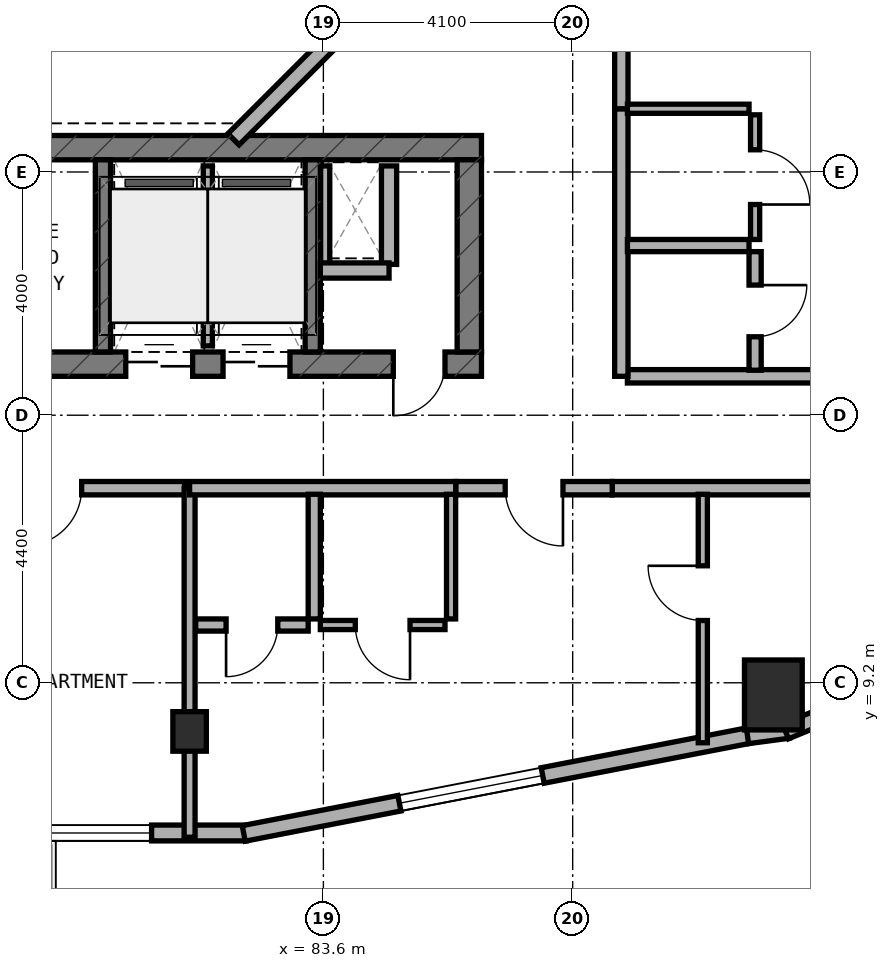
"""IFC4 building model, lengths in metres.
Left out: names, types, materials, properties, quantities, classifications, styles, units other than length and angle.
Written with IfcOpenShell. Run it as: python <this file> out.ifc"""

import sys

from ifc_helpers import new_model, si_unit, direction, frame, frame_2d, origin, origin_2d, place, context, subcontext, project, spatial, rectangle, extrude, element, fill, save


model = new_model("IFC4")
c1 = context("Model", 3, precision=1e-05, world=origin(), true_north=direction((0.0, 1.0)))
c2 = subcontext(c1, "Body", "Model", "MODEL_VIEW")
j1 = project(units=[si_unit("LENGTHUNIT", "METRE"), si_unit("PLANEANGLEUNIT", "RADIAN")], contexts=[c1])
p1 = place(None, origin())
s1 = spatial("IfcSite", under=j1, at=p1, CompositionType="ELEMENT")
p2 = place(p1, origin())
s2 = spatial("IfcBuilding", under=s1, at=p2, CompositionType="ELEMENT")
p3 = place(p2, frame((0.0, 0.0, 124.0)))
s3 = spatial("IfcBuildingStorey", under=s2, at=p3, CompositionType="ELEMENT", Elevation=124.0)
p4 = place(p3, frame((68.0, 14.44, 0.0), z_axis=(0.0, 0.0, 1.0), x_axis=(1.0, 0.0, 0.0)))
e1 = element("IfcWall", 1, at=p4, inside=s3, PredefinedType="SHEAR", context=c2, shape_type="SweptSolid", body=[
    extrude(rectangle(XDim=18.2, YDim=0.4, at=frame_2d((9.1, 0.0))), origin(), (0.0, 0.0, 1.0), 3.5),
])
p5 = place(p4, frame((9.15, 0.0, 0.0)))
e2 = element("IfcOpeningElement", 2, at=p5, cuts=e1, PredefinedType="OPENING", context=c2, shape_type="SweptSolid", body=[
    extrude(rectangle(XDim=1.2, YDim=2.15, at=frame_2d((0.6, 1.075))), frame((0.0, 0.21, 0.0), z_axis=(0.0, -1.0, 0.0), x_axis=(1.0, 0.0, 0.0)), (0.0, 0.0, 1.0), 0.42),
])
p6 = place(p4, frame((16.75, 0.0, 0.0)))
e3 = element("IfcOpeningElement", 3, at=p6, cuts=e1, PredefinedType="OPENING", context=c2, shape_type="SweptSolid", body=[
    extrude(rectangle(XDim=0.85, YDim=2.1, at=frame_2d((0.425, 1.05))), frame((0.0, 0.21, 0.0), z_axis=(0.0, -1.0, 0.0), x_axis=(1.0, 0.0, 0.0)), (0.0, 0.0, 1.0), 0.42),
])
p7 = place(p4, frame((12.35, 0.0, 0.0)))
e4 = element("IfcOpeningElement", 4, at=p7, cuts=e1, PredefinedType="OPENING", context=c2, shape_type="SweptSolid", body=[
    extrude(rectangle(XDim=1.1, YDim=2.15, at=frame_2d((0.55, 1.075))), frame((0.0, 0.21, 0.0), z_axis=(0.0, -1.0, 0.0), x_axis=(1.0, 0.0, 0.0)), (0.0, 0.0, 1.0), 0.42),
])
p8 = place(p4, frame((13.95, 0.0, 0.0)))
e5 = element("IfcOpeningElement", 5, at=p8, cuts=e1, PredefinedType="OPENING", context=c2, shape_type="SweptSolid", body=[
    extrude(rectangle(XDim=1.1, YDim=2.15, at=frame_2d((0.55, 1.075))), frame((0.0, 0.21, 0.0), z_axis=(0.0, -1.0, 0.0), x_axis=(1.0, 0.0, 0.0)), (0.0, 0.0, 1.0), 0.42),
])
p9 = place(p3, frame((68.0, 18.0, 0.0), z_axis=(0.0, 0.0, 1.0), x_axis=(1.0, 0.0, 0.0)))
e6 = element("IfcWall", 6, at=p9, inside=s3, PredefinedType="SHEAR", context=c2, shape_type="SweptSolid", body=[
    extrude(rectangle(XDim=18.2, YDim=0.4, at=frame_2d((9.1, 0.0))), origin(), (0.0, 0.0, 1.0), 3.5),
])
p10 = place(p3, frame((86.0, 14.64, 0.0), z_axis=(0.0, 0.0, 1.0), x_axis=(0.0, 1.0, 0.0)))
e7 = element("IfcWall", 7, at=p10, inside=s3, PredefinedType="SHEAR", context=c2, shape_type="SweptSolid", body=[
    extrude(rectangle(XDim=3.16, YDim=0.4, at=frame_2d((1.58, 0.0))), origin(), (0.0, 0.0, 1.0), 3.5),
])
for number, where, z_axis, x_axis in (
    (8, (79.975, 14.64, 0.0), (0.0, 0.0, 1.0), (0.0, 1.0, 0.0)),
    (9, (83.425, 14.64, 0.0), (0.0, 0.0, 1.0), (0.0, 1.0, 0.0)),
):
    element("IfcWall", number, at=place(p3, frame(where, z_axis=z_axis, x_axis=x_axis)), inside=s3, PredefinedType="STANDARD", context=c2, shape_type="SweptSolid", body=[
        extrude(rectangle(XDim=3.16, YDim=0.25, at=frame_2d((1.58, 0.0))), origin(), (0.0, 0.0, 1.0), 3.25),
    ])
p11 = place(p3, frame((81.4, 8.4, 0.0), z_axis=(0.0, 0.0, 1.0), x_axis=(1.0, 0.0, 0.0)))
e10 = element("IfcColumn", 10, at=p11, inside=s3, PredefinedType="COLUMN", context=c2, shape_type="SweptSolid", body=[
    extrude(rectangle(XDim=0.55, YDim=0.65, at=origin_2d()), origin(), (0.0, 0.0, 1.0), 3.5),
])
p12 = place(p3, frame((91.0, 9.0, 0.0), z_axis=(0.0, 0.0, 1.0), x_axis=(1.0, 0.0, 0.0)))
e11 = element("IfcColumn", 11, at=p12, inside=s3, PredefinedType="COLUMN", context=c2, shape_type="SweptSolid", body=[
    extrude(rectangle(XDim=0.95, YDim=1.15, at=origin_2d()), origin(), (0.0, 0.0, 1.0), 3.5),
])
p13 = place(p3, frame((71.635, 6.73, 0.0), z_axis=(0.0, 0.0, 1.0), x_axis=(1.0, 0.0, 0.0)))
e12 = element("IfcWall", 12, at=p13, inside=s3, PredefinedType="STANDARD", context=c2, shape_type="SweptSolid", body=[
    extrude(rectangle(XDim=10.695, YDim=0.26, at=frame_2d((5.348, 0.0))), origin(), (0.0, 0.0, 1.0), 3.25),
])
p14 = place(p13, frame((4.765, 0.0, 0.0)))
e13 = element("IfcOpeningElement", 13, at=p14, cuts=e12, PredefinedType="OPENING", context=c2, shape_type="SweptSolid", body=[
    extrude(rectangle(XDim=1.2, YDim=2.15, at=frame_2d((0.6, 1.075))), frame((0.0, 0.14, 0.0), z_axis=(0.0, -1.0, 0.0), x_axis=(1.0, 0.0, 0.0)), (0.0, 0.0, 1.0), 0.28),
])
p15 = place(p13, frame((1.59, 0.0, 0.8)))
e14 = element("IfcOpeningElement", 14, at=p15, cuts=e12, PredefinedType="OPENING", context=c2, shape_type="SweptSolid", body=[
    extrude(rectangle(XDim=2.4, YDim=1.6, at=frame_2d((1.2, 0.8))), frame((0.0, 0.14, 0.0), z_axis=(0.0, -1.0, 0.0), x_axis=(1.0, 0.0, 0.0)), (0.0, 0.0, 1.0), 0.28),
])
p16 = place(p13, frame((6.74, 0.0, 0.8)))
e15 = element("IfcOpeningElement", 15, at=p16, cuts=e12, PredefinedType="OPENING", context=c2, shape_type="SweptSolid", body=[
    extrude(rectangle(XDim=2.4, YDim=1.6, at=frame_2d((1.2, 0.8))), frame((0.0, 0.14, 0.0), z_axis=(0.0, -1.0, 0.0), x_axis=(1.0, 0.0, 0.0)), (0.0, 0.0, 1.0), 0.28),
])
p17 = place(p3, frame((82.29, 6.723, 0.0), z_axis=(0.0, 0.0, 1.0), x_axis=(0.981733729692, 0.190260043057, 0.0)))
e16 = element("IfcWall", 16, at=p17, inside=s3, PredefinedType="STANDARD", context=c2, shape_type="SweptSolid", body=[
    extrude(rectangle(XDim=8.447, YDim=0.26, at=frame_2d((4.224, 0.0))), origin(), (0.0, 0.0, 1.0), 3.25),
])
p18 = place(p17, frame((2.608, 0.0, 0.8)))
e17 = element("IfcOpeningElement", 17, at=p18, cuts=e16, PredefinedType="OPENING", context=c2, shape_type="SweptSolid", body=[
    extrude(rectangle(XDim=2.4, YDim=1.6, at=frame_2d((1.2, 0.8))), frame((0.0, 0.14, 0.0), z_axis=(0.0, -1.0, 0.0), x_axis=(1.0, 0.0, 0.0)), (0.0, 0.0, 1.0), 0.28),
])
p19 = place(p3, frame((90.575, 8.328, 0.0), z_axis=(0.0, 0.0, 1.0), x_axis=(0.991300187529, 0.13162043232, 0.0)))
e18 = element("IfcWall", 18, at=p19, inside=s3, PredefinedType="STANDARD", context=c2, shape_type="SweptSolid", body=[
    extrude(rectangle(XDim=0.677, YDim=0.26, at=frame_2d((0.338, 0.0))), origin(), (0.0, 0.0, 1.0), 3.25),
])
p20 = place(p3, frame((91.2, 8.399, 0.0), z_axis=(0.0, 0.0, 1.0), x_axis=(0.924093981904, 0.382165294877, 0.0)))
e19 = element("IfcWall", 19, at=p20, inside=s3, PredefinedType="STANDARD", context=c2, shape_type="SweptSolid", body=[
    extrude(rectangle(XDim=0.694, YDim=0.26, at=frame_2d((0.347, 0.0))), origin(), (0.0, 0.0, 1.0), 3.25),
])
p21 = place(p3, frame((82.122, 18.138, 0.0), z_axis=(0.0, 0.0, 1.0), x_axis=(0.707106781187, 0.707106781187, 0.0)))
e20 = element("IfcWall", 20, at=p21, inside=s3, PredefinedType="STANDARD", context=c2, shape_type="SweptSolid", body=[
    extrude(rectangle(XDim=2.311, YDim=0.26, at=frame_2d((1.155, 0.0))), origin(), (0.0, 0.0, 1.0), 3.25),
])
p22 = place(p3, frame((83.63, 16.08, 0.0), z_axis=(0.0, 0.0, 1.0), x_axis=(0.0, 1.0, 0.0)))
e21 = element("IfcWall", 21, at=p22, inside=s3, PredefinedType="PARTITIONING", context=c2, shape_type="SweptSolid", body=[
    extrude(rectangle(XDim=1.62, YDim=0.15, at=frame_2d((0.81, 0.0))), origin(), (0.0, 0.0, 1.0), 2.825),
])
p23 = place(p3, frame((84.68, 16.08, 0.0), z_axis=(0.0, 0.0, 1.0), x_axis=(0.0, 1.0, 0.0)))
e22 = element("IfcWall", 22, at=p23, inside=s3, PredefinedType="SOLIDWALL", context=c2, shape_type="SweptSolid", body=[
    extrude(rectangle(XDim=1.62, YDim=0.25, at=frame_2d((0.81, 0.0))), origin(), (0.0, 0.0, 1.0), 3.22),
])
p24 = place(p3, frame((83.55, 15.98, 0.0), z_axis=(0.0, 0.0, 1.0), x_axis=(1.0, 0.0, 0.0)))
e23 = element("IfcWall", 23, at=p24, inside=s3, PredefinedType="SOLIDWALL", context=c2, shape_type="SweptSolid", body=[
    extrude(rectangle(XDim=1.13, YDim=0.25, at=frame_2d((0.565, 0.0))), origin(), (0.0, 0.0, 1.0), 3.22),
])
p25 = place(p3, frame((81.7, 14.74, 0.0), z_axis=(0.0, 0.0, 1.0), x_axis=(0.0, 1.0, 0.0)))
e24 = element("IfcWall", 24, at=p25, inside=s3, PredefinedType="PARTITIONING", context=c2, shape_type="SweptSolid", body=[
    extrude(rectangle(XDim=2.96, YDim=0.15, at=frame_2d((1.48, 0.0))), origin(), (0.0, 0.0, 1.0), 3.22),
])
p26 = place(p3, frame((76.98, 12.4, 0.0), z_axis=(0.0, 0.0, 1.0), x_axis=(1.0, 0.0, 0.0)))
e25 = element("IfcWall", 25, at=p26, inside=s3, PredefinedType="SOLIDWALL", context=c2, shape_type="SweptSolid", body=[
    extrude(rectangle(XDim=4.34, YDim=0.22, at=frame_2d((2.17, 0.0))), origin(), (0.0, 0.0, 1.0), 2.825),
])
p27 = place(p26, frame((1.695, 0.0, 0.0)))
e26 = element("IfcOpeningElement", 26, at=p27, cuts=e25, PredefinedType="OPENING", context=c2, shape_type="SweptSolid", body=[
    extrude(rectangle(XDim=0.95, YDim=2.1, at=frame_2d((0.475, 1.05))), frame((0.0, 0.12, 0.0), z_axis=(0.0, -1.0, 0.0), x_axis=(1.0, 0.0, 0.0)), (0.0, 0.0, 1.0), 0.24),
])
p28 = place(p3, frame((81.4, 6.66, 0.0), z_axis=(0.0, 0.0, 1.0), x_axis=(0.0, 1.0, 0.0)))
e27 = element("IfcWall", 27, at=p28, inside=s3, PredefinedType="SOLIDWALL", context=c2, shape_type="SweptSolid", body=[
    extrude(rectangle(XDim=5.74, YDim=0.18, at=frame_2d((2.87, 0.0))), origin(), (0.0, 0.0, 1.0), 2.825),
])
p29 = place(p3, frame((81.4, 12.4, 0.0), z_axis=(0.0, 0.0, 1.0), x_axis=(1.0, 0.0, 0.0)))
e28 = element("IfcWall", 28, at=p29, inside=s3, PredefinedType="SOLIDWALL", context=c2, shape_type="SweptSolid", body=[
    extrude(rectangle(XDim=4.38, YDim=0.22, at=frame_2d((2.19, 0.0))), origin(), (0.0, 0.0, 1.0), 2.825),
])
p30 = place(p3, frame((88.35, 12.4, 0.0), z_axis=(0.0, 0.0, 1.0), x_axis=(1.0, 0.0, 0.0)))
e29 = element("IfcWall", 29, at=p30, inside=s3, PredefinedType="SOLIDWALL", context=c2, shape_type="SweptSolid", body=[
    extrude(rectangle(XDim=6.29, YDim=0.22, at=frame_2d((3.145, 0.0))), origin(), (0.0, 0.0, 1.0), 2.945),
])
p31 = place(p3, frame((85.78, 12.4, 0.0), z_axis=(0.0, 0.0, 1.0), x_axis=(1.0, 0.0, 0.0)))
e30 = element("IfcWall", 30, at=p31, inside=s3, PredefinedType="SOLIDWALL", context=c2, shape_type="SweptSolid", body=[
    extrude(rectangle(XDim=2.57, YDim=0.22, at=frame_2d((1.285, 0.0))), origin(), (0.0, 0.0, 1.0), 3.22),
])
p32 = place(p31, frame((0.81, 0.0, 0.0)))
e31 = element("IfcOpeningElement", 31, at=p32, cuts=e30, PredefinedType="OPENING", context=c2, shape_type="SweptSolid", body=[
    extrude(rectangle(XDim=0.95, YDim=2.1, at=frame_2d((0.475, 1.05))), frame((0.0, 0.12, 0.0), z_axis=(0.0, -1.0, 0.0), x_axis=(1.0, 0.0, 0.0)), (0.0, 0.0, 1.0), 0.24),
])
p33 = place(p3, frame((89.84, 8.214, 0.0), z_axis=(0.0, 0.0, 1.0), x_axis=(0.0, 1.0, 0.0)))
e32 = element("IfcWall", 32, at=p33, inside=s3, PredefinedType="PARTITIONING", context=c2, shape_type="SweptSolid", body=[
    extrude(rectangle(XDim=4.086, YDim=0.15, at=frame_2d((2.043, 0.0))), origin(), (0.0, 0.0, 1.0), 2.945),
])
p34 = place(p33, frame((2.01, 0.0, 0.0)))
e33 = element("IfcOpeningElement", 33, at=p34, cuts=e32, PredefinedType="OPENING", context=c2, shape_type="SweptSolid", body=[
    extrude(rectangle(XDim=0.9, YDim=2.1, at=frame_2d((0.45, 1.05))), frame((0.0, 0.085, 0.0), z_axis=(0.0, -1.0, 0.0), x_axis=(1.0, 0.0, 0.0)), (0.0, 0.0, 1.0), 0.17),
])
p35 = place(p3, frame((83.45, 10.25, 0.0), z_axis=(0.0, 0.0, 1.0), x_axis=(0.0, 1.0, 0.0)))
e34 = element("IfcWall", 34, at=p35, inside=s3, PredefinedType="PLUMBINGWALL", context=c2, shape_type="SweptSolid", body=[
    extrude(rectangle(XDim=2.05, YDim=0.2, at=frame_2d((1.025, 0.0))), origin(), (0.0, 0.0, 1.0), 3.22),
])
p36 = place(p3, frame((85.7, 10.25, 0.0), z_axis=(0.0, 0.0, 1.0), x_axis=(0.0, 1.0, 0.0)))
e35 = element("IfcWall", 35, at=p36, inside=s3, PredefinedType="PARTITIONING", context=c2, shape_type="SweptSolid", body=[
    extrude(rectangle(XDim=2.05, YDim=0.15, at=frame_2d((1.025, 0.0))), origin(), (0.0, 0.0, 1.0), 3.22),
])
p37 = place(p3, frame((81.5, 10.15, 0.0), z_axis=(0.0, 0.0, 1.0), x_axis=(1.0, 0.0, 0.0)))
e36 = element("IfcWall", 36, at=p37, inside=s3, PredefinedType="PLUMBINGWALL", context=c2, shape_type="SweptSolid", body=[
    extrude(rectangle(XDim=1.85, YDim=0.2, at=frame_2d((0.925, 0.0))), origin(), (0.0, 0.0, 1.0), 2.825),
])
p38 = place(p37, frame((0.5, 0.0, 0.0)))
e37 = element("IfcOpeningElement", 37, at=p38, cuts=e36, PredefinedType="OPENING", context=c2, shape_type="SweptSolid", body=[
    extrude(rectangle(XDim=0.85, YDim=2.1, at=frame_2d((0.425, 1.05))), frame((0.0, 0.11, 0.0), z_axis=(0.0, -1.0, 0.0), x_axis=(1.0, 0.0, 0.0)), (0.0, 0.0, 1.0), 0.22),
])
p39 = place(p3, frame((83.55, 10.15, 0.0), z_axis=(0.0, 0.0, 1.0), x_axis=(1.0, 0.0, 0.0)))
e38 = element("IfcWall", 38, at=p39, inside=s3, PredefinedType="PARTITIONING", context=c2, shape_type="SweptSolid", body=[
    extrude(rectangle(XDim=2.05, YDim=0.15, at=frame_2d((1.025, 0.0))), origin(), (0.0, 0.0, 1.0), 3.22),
])
p40 = place(p39, frame((0.575, 0.0, 0.0)))
e39 = element("IfcOpeningElement", 39, at=p40, cuts=e38, PredefinedType="OPENING", context=c2, shape_type="SweptSolid", body=[
    extrude(rectangle(XDim=0.9, YDim=2.1, at=frame_2d((0.45, 1.05))), frame((0.0, 0.085, 0.0), z_axis=(0.0, -1.0, 0.0), x_axis=(1.0, 0.0, 0.0)), (0.0, 0.0, 1.0), 0.17),
])
p41 = place(p3, frame((88.6, 14.24, 0.0), z_axis=(0.0, 0.0, 1.0), x_axis=(1.0, 0.0, 0.0)))
e40 = element("IfcWall", 40, at=p41, inside=s3, PredefinedType="SOLIDWALL", context=c2, shape_type="SweptSolid", body=[
    extrude(rectangle(XDim=5.88, YDim=0.22, at=frame_2d((2.94, 0.0))), origin(), (0.0, 0.0, 1.0), 2.945),
])
p42 = place(p3, frame((88.5, 14.24, 0.0), z_axis=(0.0, 0.0, 1.0), x_axis=(0.0, 1.0, 0.0)))
e41 = element("IfcWall", 41, at=p42, inside=s3, PredefinedType="SOLIDWALL", context=c2, shape_type="SweptSolid", body=[
    extrude(rectangle(XDim=4.4, YDim=0.22, at=frame_2d((2.2, 0.0))), origin(), (0.0, 0.0, 1.0), 3.22),
])
p43 = place(p3, frame((88.5, 18.64, 0.0), z_axis=(0.0, 0.0, 1.0), x_axis=(0.0, 1.0, 0.0)))
e42 = element("IfcWall", 42, at=p43, inside=s3, PredefinedType="SOLIDWALL", context=c2, shape_type="SweptSolid", body=[
    extrude(rectangle(XDim=3.36, YDim=0.22, at=frame_2d((1.68, 0.0))), origin(), (0.0, 0.0, 1.0), 2.825),
])
p44 = place(p43, frame((1.205, 0.0, 0.0)))
e43 = element("IfcOpeningElement", 43, at=p44, cuts=e42, PredefinedType="OPENING", context=c2, shape_type="SweptSolid", body=[
    extrude(rectangle(XDim=0.95, YDim=2.1, at=frame_2d((0.475, 1.05))), frame((0.0, 0.12, 0.0), z_axis=(0.0, -1.0, 0.0), x_axis=(1.0, 0.0, 0.0)), (0.0, 0.0, 1.0), 0.24),
])
p45 = place(p3, frame((88.6, 16.39, 0.0), z_axis=(0.0, 0.0, 1.0), x_axis=(1.0, 0.0, 0.0)))
e44 = element("IfcWall", 44, at=p45, inside=s3, PredefinedType="PLUMBINGWALL", context=c2, shape_type="SweptSolid", body=[
    extrude(rectangle(XDim=2.0, YDim=0.2, at=frame_2d((1.0, 0.0))), origin(), (0.0, 0.0, 1.0), 3.22),
])
p46 = place(p3, frame((88.6, 18.64, 0.0), z_axis=(0.0, 0.0, 1.0), x_axis=(1.0, 0.0, 0.0)))
e45 = element("IfcWall", 45, at=p46, inside=s3, PredefinedType="PARTITIONING", context=c2, shape_type="SweptSolid", body=[
    extrude(rectangle(XDim=2.0, YDim=0.15, at=frame_2d((1.0, 0.0))), origin(), (0.0, 0.0, 1.0), 3.22),
])
p47 = place(p3, frame((90.7, 14.34, 0.0), z_axis=(0.0, 0.0, 1.0), x_axis=(0.0, 1.0, 0.0)))
e46 = element("IfcWall", 46, at=p47, inside=s3, PredefinedType="PLUMBINGWALL", context=c2, shape_type="SweptSolid", body=[
    extrude(rectangle(XDim=1.95, YDim=0.2, at=frame_2d((0.975, 0.0))), origin(), (0.0, 0.0, 1.0), 3.22),
])
p48 = place(p47, frame((0.55, 0.0, 0.0)))
e47 = element("IfcOpeningElement", 47, at=p48, cuts=e46, PredefinedType="OPENING", context=c2, shape_type="SweptSolid", body=[
    extrude(rectangle(XDim=0.85, YDim=2.1, at=frame_2d((0.425, 1.05))), frame((0.0, 0.11, 0.0), z_axis=(0.0, -1.0, 0.0), x_axis=(1.0, 0.0, 0.0)), (0.0, 0.0, 1.0), 0.22),
])
p49 = place(p3, frame((90.7, 16.49, 0.0), z_axis=(0.0, 0.0, 1.0), x_axis=(0.0, 1.0, 0.0)))
e48 = element("IfcWall", 48, at=p49, inside=s3, PredefinedType="PARTITIONING", context=c2, shape_type="SweptSolid", body=[
    extrude(rectangle(XDim=2.05, YDim=0.15, at=frame_2d((1.025, 0.0))), origin(), (0.0, 0.0, 1.0), 3.22),
])
p50 = place(p49, frame((0.575, 0.0, 0.0)))
e49 = element("IfcOpeningElement", 49, at=p50, cuts=e48, PredefinedType="OPENING", context=c2, shape_type="SweptSolid", body=[
    extrude(rectangle(XDim=0.9, YDim=2.1, at=frame_2d((0.45, 1.05))), frame((0.0, 0.085, 0.0), z_axis=(0.0, -1.0, 0.0), x_axis=(1.0, 0.0, 0.0)), (0.0, 0.0, 1.0), 0.17),
])
p51 = place(p16, origin())
e50 = element("IfcWindow", 50, at=p51, inside=s3, PartitioningType="SINGLE_PANEL", PredefinedType="WINDOW", context=c2, shape_type="SweptSolid", body=[
    extrude(rectangle(XDim=2.4, YDim=1.6, at=frame_2d((1.2, 0.8))), frame((0.0, 0.03, 0.0), z_axis=(0.0, -1.0, 0.0), x_axis=(1.0, 0.0, 0.0)), (0.0, 0.0, 1.0), 0.06),
])
fill(e15, e50)
p52 = place(p18, origin())
e51 = element("IfcWindow", 51, at=p52, inside=s3, PartitioningType="SINGLE_PANEL", PredefinedType="WINDOW", context=c2, shape_type="SweptSolid", body=[
    extrude(rectangle(XDim=2.4, YDim=1.6, at=frame_2d((1.2, 0.8))), frame((0.0, 0.03, 0.0), z_axis=(0.0, -1.0, 0.0), x_axis=(1.0, 0.0, 0.0)), (0.0, 0.0, 1.0), 0.06),
])
fill(e17, e51)
p53 = place(p6, frame((0.85, 0.0, 0.0), z_axis=(0.0, 0.0, 1.0), x_axis=(-1.0, 0.0, 0.0)))
e52 = element("IfcDoor", 52, at=p53, inside=s3, OperationType="SINGLE_SWING_RIGHT", PredefinedType="DOOR", context=c2, shape_type="SweptSolid", body=[
    extrude(rectangle(XDim=0.85, YDim=2.1, at=frame_2d((0.425, 1.05))), frame((0.0, 0.025, 0.0), z_axis=(0.0, -1.0, 0.0), x_axis=(1.0, 0.0, 0.0)), (0.0, 0.0, 1.0), 0.05),
])
fill(e3, e52)
p54 = place(p7, frame((1.1, 0.0, 0.0), z_axis=(0.0, 0.0, 1.0), x_axis=(-1.0, 0.0, 0.0)))
e53 = element("IfcDoor", 53, at=p54, inside=s3, OperationType="DOUBLE_DOOR_SLIDING", PredefinedType="DOOR", context=c2, shape_type="SweptSolid", body=[
    extrude(rectangle(XDim=1.1, YDim=2.15, at=frame_2d((0.55, 1.075))), frame((0.0, 0.025, 0.0), z_axis=(0.0, -1.0, 0.0), x_axis=(1.0, 0.0, 0.0)), (0.0, 0.0, 1.0), 0.05),
])
fill(e4, e53)
p55 = place(p8, frame((1.1, 0.0, 0.0), z_axis=(0.0, 0.0, 1.0), x_axis=(-1.0, 0.0, 0.0)))
e54 = element("IfcDoor", 54, at=p55, inside=s3, OperationType="DOUBLE_DOOR_SLIDING", PredefinedType="DOOR", context=c2, shape_type="SweptSolid", body=[
    extrude(rectangle(XDim=1.1, YDim=2.15, at=frame_2d((0.55, 1.075))), frame((0.0, 0.025, 0.0), z_axis=(0.0, -1.0, 0.0), x_axis=(1.0, 0.0, 0.0)), (0.0, 0.0, 1.0), 0.05),
])
fill(e5, e54)
p56 = place(p27, frame((0.95, 0.0, 0.0), z_axis=(0.0, 0.0, 1.0), x_axis=(-1.0, 0.0, 0.0)))
e55 = element("IfcDoor", 55, at=p56, inside=s3, OperationType="SINGLE_SWING_RIGHT", PredefinedType="DOOR", context=c2, shape_type="SweptSolid", body=[
    extrude(rectangle(XDim=0.95, YDim=2.1, at=frame_2d((0.475, 1.05))), frame((0.0, 0.025, 0.0), z_axis=(0.0, -1.0, 0.0), x_axis=(1.0, 0.0, 0.0)), (0.0, 0.0, 1.0), 0.05),
])
fill(e26, e55)
p57 = place(p32, frame((0.95, 0.0, 0.0), z_axis=(0.0, 0.0, 1.0), x_axis=(-1.0, 0.0, 0.0)))
e56 = element("IfcDoor", 56, at=p57, inside=s3, OperationType="SINGLE_SWING_LEFT", PredefinedType="DOOR", context=c2, shape_type="SweptSolid", body=[
    extrude(rectangle(XDim=0.95, YDim=2.1, at=frame_2d((0.475, 1.05))), frame((0.0, 0.025, 0.0), z_axis=(0.0, -1.0, 0.0), x_axis=(1.0, 0.0, 0.0)), (0.0, 0.0, 1.0), 0.05),
])
fill(e31, e56)
p58 = place(p34, origin())
e57 = element("IfcDoor", 57, at=p58, inside=s3, OperationType="SINGLE_SWING_RIGHT", PredefinedType="DOOR", context=c2, shape_type="SweptSolid", body=[
    extrude(rectangle(XDim=0.9, YDim=2.1, at=frame_2d((0.45, 1.05))), frame((0.0, 0.025, 0.0), z_axis=(0.0, -1.0, 0.0), x_axis=(1.0, 0.0, 0.0)), (0.0, 0.0, 1.0), 0.05),
])
fill(e33, e57)
p59 = place(p38, frame((0.85, 0.0, 0.0), z_axis=(0.0, 0.0, 1.0), x_axis=(-1.0, 0.0, 0.0)))
e58 = element("IfcDoor", 58, at=p59, inside=s3, OperationType="SINGLE_SWING_RIGHT", PredefinedType="DOOR", context=c2, shape_type="SweptSolid", body=[
    extrude(rectangle(XDim=0.85, YDim=2.1, at=frame_2d((0.425, 1.05))), frame((0.0, 0.025, 0.0), z_axis=(0.0, -1.0, 0.0), x_axis=(1.0, 0.0, 0.0)), (0.0, 0.0, 1.0), 0.05),
])
fill(e37, e58)
p60 = place(p40, frame((0.9, 0.0, 0.0), z_axis=(0.0, 0.0, 1.0), x_axis=(-1.0, 0.0, 0.0)))
e59 = element("IfcDoor", 59, at=p60, inside=s3, OperationType="SINGLE_SWING_LEFT", PredefinedType="DOOR", context=c2, shape_type="SweptSolid", body=[
    extrude(rectangle(XDim=0.9, YDim=2.1, at=frame_2d((0.45, 1.05))), frame((0.0, 0.025, 0.0), z_axis=(0.0, -1.0, 0.0), x_axis=(1.0, 0.0, 0.0)), (0.0, 0.0, 1.0), 0.05),
])
fill(e39, e59)
p61 = place(p48, frame((0.85, 0.0, 0.0), z_axis=(0.0, 0.0, 1.0), x_axis=(-1.0, 0.0, 0.0)))
e60 = element("IfcDoor", 60, at=p61, inside=s3, OperationType="SINGLE_SWING_LEFT", PredefinedType="DOOR", context=c2, shape_type="SweptSolid", body=[
    extrude(rectangle(XDim=0.85, YDim=2.1, at=frame_2d((0.425, 1.05))), frame((0.0, 0.025, 0.0), z_axis=(0.0, -1.0, 0.0), x_axis=(1.0, 0.0, 0.0)), (0.0, 0.0, 1.0), 0.05),
])
fill(e47, e60)
p62 = place(p50, frame((0.9, 0.0, 0.0), z_axis=(0.0, 0.0, 1.0), x_axis=(-1.0, 0.0, 0.0)))
e61 = element("IfcDoor", 61, at=p62, inside=s3, OperationType="SINGLE_SWING_RIGHT", PredefinedType="DOOR", context=c2, shape_type="SweptSolid", body=[
    extrude(rectangle(XDim=0.9, YDim=2.1, at=frame_2d((0.45, 1.05))), frame((0.0, 0.025, 0.0), z_axis=(0.0, -1.0, 0.0), x_axis=(1.0, 0.0, 0.0)), (0.0, 0.0, 1.0), 0.05),
])
fill(e49, e61)
save(model, sys.argv[1])
